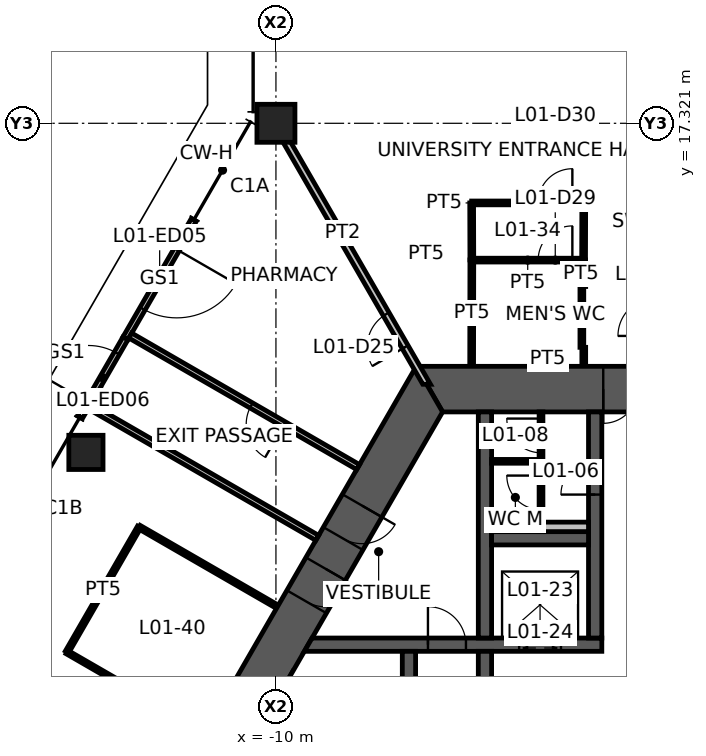
"""IFC4 building model, lengths in metres.
Left out: names, types, materials, properties, quantities, classifications, styles, units other than length and angle.
Written with IfcOpenShell. Run it as: python <this file> out.ifc"""

import sys

from ifc_helpers import new_model, si_unit, direction, frame, frame_2d, origin, origin_2d, place, context, subcontext, project, spatial, polyline, rectangle, hollow_rectangle, outline, extrude, element, fill, save


model = new_model("IFC4")
c1 = context("Model", 3, precision=1e-05, world=origin(), true_north=direction((0.0, 1.0)))
c2 = subcontext(c1, "Body", "Model", "MODEL_VIEW")
j1 = project(units=[si_unit("LENGTHUNIT", "METRE"), si_unit("PLANEANGLEUNIT", "RADIAN")], contexts=[c1])
p1 = place(None, origin())
s1 = spatial("IfcSite", under=j1, at=p1, CompositionType="ELEMENT")
p2 = place(p1, origin())
s2 = spatial("IfcBuilding", under=s1, at=p2, CompositionType="ELEMENT")
p3 = place(p2, origin())
s3 = spatial("IfcBuildingStorey", under=s2, at=p3, CompositionType="ELEMENT", Elevation=0.0)
p4 = place(p3, frame((-10.0, 17.321, 0.0), z_axis=(0.0, 0.0, 1.0), x_axis=(1.0, 0.0, 0.0)))
e1 = element("IfcColumn", 1, at=p4, inside=s3, PredefinedType="COLUMN", context=c2, shape_type="SweptSolid", body=[
    extrude(hollow_rectangle(XDim=1.0, YDim=1.0, WallThickness=0.06, at=origin_2d()), origin(), (0.0, 0.0, 1.0), 5.5),
])
p5 = place(p3, frame((-15.0, 8.66, 0.0), z_axis=(0.0, 0.0, 1.0), x_axis=(1.0, 0.0, 0.0)))
e2 = element("IfcColumn", 2, at=p5, inside=s3, PredefinedType="COLUMN", context=c2, shape_type="SweptSolid", body=[
    extrude(hollow_rectangle(XDim=0.9, YDim=0.9, WallThickness=0.05, at=origin_2d()), origin(), (0.0, 0.0, 1.0), 5.5),
])
p6 = place(p3, frame((5.961, 10.325, 0.0), z_axis=(0.0, 0.0, 1.0), x_axis=(-1.0, 0.0, 0.0)))
e3 = element("IfcWall", 3, at=p6, inside=s3, PredefinedType="SHEAR", context=c2, shape_type="SweptSolid", body=[
    extrude(outline(polyline([(-0.346, -0.6), (4.574, -0.6), (5.474, -0.6), (6.449, -0.6), (7.349, -0.6), (12.269, -0.6), (11.576, 0.6), (7.349, 0.6), (6.449, 0.6), (5.474, 0.6), (4.574, 0.6), (0.346, 0.6), (-0.346, -0.6)])), origin(), (0.0, 0.0, 1.0), 5.5),
])
p7 = place(p6, frame((6.449, 0.0, 0.0)))
e4 = element("IfcOpeningElement", 4, at=p7, cuts=e3, PredefinedType="OPENING", context=c2, shape_type="SweptSolid", body=[
    extrude(rectangle(XDim=0.9, YDim=2.1, at=frame_2d((0.45, 1.05))), frame((0.0, 0.61, 0.0), z_axis=(0.0, -1.0, 0.0), x_axis=(1.0, 0.0, 0.0)), (0.0, 0.0, 1.0), 1.22),
])
p8 = place(p6, frame((4.574, 0.0, 0.0)))
e5 = element("IfcOpeningElement", 5, at=p8, cuts=e3, PredefinedType="OPENING", context=c2, shape_type="SweptSolid", body=[
    extrude(rectangle(XDim=0.9, YDim=2.1, at=frame_2d((0.45, 1.05))), frame((0.0, 0.61, 0.0), z_axis=(0.0, -1.0, 0.0), x_axis=(1.0, 0.0, 0.0)), (0.0, 0.0, 1.0), 1.22),
])
p9 = place(p3, frame((-5.961, 10.325, 0.0), z_axis=(0.0, 0.0, 1.0), x_axis=(-0.500004296715, -0.866022923061, 0.0)))
e6 = element("IfcWall", 6, at=p9, inside=s3, PredefinedType="SHEAR", context=c2, shape_type="SweptSolid", body=[
    extrude(outline(polyline([(-0.346, -0.6), (3.541, -0.6), (4.541, -0.6), (5.461, -0.6), (6.461, -0.6), (12.269, -0.6), (11.576, 0.6), (6.461, 0.6), (5.461, 0.6), (4.541, 0.6), (3.541, 0.6), (0.346, 0.6), (-0.346, -0.6)])), origin(), (0.0, 0.0, 1.0), 5.5),
])
p10 = place(p9, frame((3.541, 0.0, 0.0)))
e7 = element("IfcOpeningElement", 7, at=p10, cuts=e6, PredefinedType="OPENING", context=c2, shape_type="SweptSolid", body=[
    extrude(rectangle(XDim=1.0, YDim=2.1, at=frame_2d((0.5, 1.05))), frame((0.0, 0.61, 0.0), z_axis=(0.0, -1.0, 0.0), x_axis=(1.0, 0.0, 0.0)), (0.0, 0.0, 1.0), 1.22),
])
p11 = place(p9, frame((5.461, 0.0, 0.0)))
e8 = element("IfcOpeningElement", 8, at=p11, cuts=e6, PredefinedType="OPENING", context=c2, shape_type="SweptSolid", body=[
    extrude(rectangle(XDim=1.0, YDim=2.1, at=frame_2d((0.5, 1.05))), frame((0.0, 0.61, 0.0), z_axis=(0.0, -1.0, 0.0), x_axis=(1.0, 0.0, 0.0)), (0.0, 0.0, 1.0), 1.22),
])
p12 = place(p3, frame((-12.16, 14.78, 0.0), z_axis=(0.0, 0.0, 1.0), x_axis=(-0.499961193289, -0.866047807691, 0.0)))
e9 = element("IfcWall", 9, at=p12, inside=s3, PredefinedType="STANDARD", context=c2, shape_type="SweptSolid", body=[
    extrude(rectangle(XDim=3.6, YDim=0.15, at=frame_2d((1.8, 0.0))), origin(), (0.0, 0.0, 1.0), 5.5),
])
p13 = place(p12, frame((0.9, 0.0, 0.0)))
e10 = element("IfcOpeningElement", 10, at=p13, cuts=e9, PredefinedType="OPENING", context=c2, shape_type="SweptSolid", body=[
    extrude(rectangle(XDim=1.8, YDim=2.4, at=frame_2d((0.9, 1.2))), frame((0.0, 0.085, 0.0), z_axis=(0.0, -1.0, 0.0), x_axis=(1.0, 0.0, 0.0)), (0.0, 0.0, 1.0), 0.17),
])
p14 = place(p3, frame((-15.16, 9.584, 0.0), z_axis=(0.0, 0.0, 1.0), x_axis=(0.499957262057, 0.866050077142, 0.0)))
e11 = element("IfcWall", 11, at=p14, inside=s3, PredefinedType="STANDARD", context=c2, shape_type="SweptSolid", body=[
    extrude(rectangle(XDim=2.4, YDim=0.15, at=frame_2d((1.2, 0.0))), origin(), (0.0, 0.0, 1.0), 5.5),
])
p15 = place(p14, frame((0.45, 0.0, 0.0)))
e12 = element("IfcOpeningElement", 12, at=p15, cuts=e11, PredefinedType="OPENING", context=c2, shape_type="SweptSolid", body=[
    extrude(rectangle(XDim=1.5, YDim=2.4, at=frame_2d((0.75, 1.2))), frame((0.0, 0.085, 0.0), z_axis=(0.0, -1.0, 0.0), x_axis=(1.0, 0.0, 0.0)), (0.0, 0.0, 1.0), 0.17),
])
p16 = place(p3, frame((-9.151, 3.6, 0.0), z_axis=(0.0, 0.0, 1.0), x_axis=(1.0, 0.0, 0.0)))
e13 = element("IfcWall", 13, at=p16, inside=s3, PredefinedType="SHEAR", context=c2, shape_type="SweptSolid", body=[
    extrude(outline(polyline([(-0.101, -0.175), (3.151, -0.175), (4.151, -0.175), (5.551, -0.175), (6.651, -0.175), (7.726, -0.175), (7.726, 0.175), (6.651, 0.175), (5.551, 0.175), (4.151, 0.175), (3.151, 0.175), (0.101, 0.175), (-0.101, -0.175)])), origin(), (0.0, 0.0, 1.0), 5.5),
])
p17 = place(p16, frame((3.151, 0.0, 0.0)))
e14 = element("IfcOpeningElement", 14, at=p17, cuts=e13, PredefinedType="OPENING", context=c2, shape_type="SweptSolid", body=[
    extrude(rectangle(XDim=1.0, YDim=2.1, at=frame_2d((0.5, 1.05))), frame((0.0, 0.185, 0.0), z_axis=(0.0, -1.0, 0.0), x_axis=(1.0, 0.0, 0.0)), (0.0, 0.0, 1.0), 0.37),
])
p18 = place(p16, frame((5.551, 0.0, 0.0)))
e15 = element("IfcOpeningElement", 15, at=p18, cuts=e13, PredefinedType="OPENING", context=c2, shape_type="SweptSolid", body=[
    extrude(rectangle(XDim=1.1, YDim=2.1, at=frame_2d((0.55, 1.05))), frame((0.0, 0.185, 0.0), z_axis=(0.0, -1.0, 0.0), x_axis=(1.0, 0.0, 0.0)), (0.0, 0.0, 1.0), 0.37),
])
p19 = place(p3, frame((-1.6, 3.775, 0.0), z_axis=(0.0, 0.0, 1.0), x_axis=(0.0, 1.0, 0.0)))
e16 = element("IfcWall", 16, at=p19, inside=s3, PredefinedType="SHEAR", context=c2, shape_type="SweptSolid", body=[
    extrude(rectangle(XDim=5.95, YDim=0.35, at=frame_2d((2.975, 0.0))), origin(), (0.0, 0.0, 1.0), 5.5),
])
p20 = place(p19, frame((3.775, 0.0, 0.0)))
e17 = element("IfcOpeningElement", 17, at=p20, cuts=e16, PredefinedType="OPENING", context=c2, shape_type="SweptSolid", body=[
    extrude(rectangle(XDim=0.9, YDim=2.1, at=frame_2d((0.45, 1.05))), frame((0.0, 0.185, 0.0), z_axis=(0.0, -1.0, 0.0), x_axis=(1.0, 0.0, 0.0)), (0.0, 0.0, 1.0), 0.37),
])
p21 = place(p3, frame((-4.5, -3.425, 0.0), z_axis=(0.0, 0.0, 1.0), x_axis=(0.0, 1.0, 0.0)))
e18 = element("IfcWall", 18, at=p21, inside=s3, PredefinedType="SHEAR", context=c2, shape_type="SweptSolid", body=[
    extrude(rectangle(XDim=6.85, YDim=0.35, at=frame_2d((3.425, 0.0))), origin(), (0.0, 0.0, 1.0), 5.5),
])
p22 = place(p21, frame((2.925, 0.0, 0.0)))
e19 = element("IfcOpeningElement", 19, at=p22, cuts=e18, PredefinedType="OPENING", context=c2, shape_type="SweptSolid", body=[
    extrude(rectangle(XDim=1.0, YDim=2.1, at=frame_2d((0.5, 1.05))), frame((0.0, 0.185, 0.0), z_axis=(0.0, -1.0, 0.0), x_axis=(1.0, 0.0, 0.0)), (0.0, 0.0, 1.0), 0.37),
])
p23 = place(p3, frame((-6.5, -3.425, 0.0), z_axis=(0.0, 0.0, 1.0), x_axis=(0.0, 1.0, 0.0)))
e20 = element("IfcWall", 20, at=p23, inside=s3, PredefinedType="SHEAR", context=c2, shape_type="SweptSolid", body=[
    extrude(rectangle(XDim=6.85, YDim=0.35, at=frame_2d((3.425, 0.0))), origin(), (0.0, 0.0, 1.0), 5.5),
])
p24 = place(p23, frame((0.1, 0.0, 0.0)))
e21 = element("IfcOpeningElement", 21, at=p24, cuts=e20, PredefinedType="OPENING", context=c2, shape_type="SweptSolid", body=[
    extrude(rectangle(XDim=1.0, YDim=2.1, at=frame_2d((0.5, 1.05))), frame((0.0, 0.185, 0.0), z_axis=(0.0, -1.0, 0.0), x_axis=(1.0, 0.0, 0.0)), (0.0, 0.0, 1.0), 0.37),
])
p25 = place(p3, frame((-4.5, 3.775, 0.0), z_axis=(0.0, 0.0, 1.0), x_axis=(0.0, 1.0, 0.0)))
e22 = element("IfcWall", 22, at=p25, inside=s3, PredefinedType="SHEAR", context=c2, shape_type="SweptSolid", body=[
    extrude(rectangle(XDim=5.95, YDim=0.35, at=frame_2d((2.975, 0.0))), origin(), (0.0, 0.0, 1.0), 5.5),
])
p26 = place(p3, frame((-4.325, 6.4, 0.0), z_axis=(0.0, 0.0, 1.0), x_axis=(1.0, 0.0, 0.0)))
e23 = element("IfcWall", 23, at=p26, inside=s3, PredefinedType="SHEAR", context=c2, shape_type="SweptSolid", body=[
    extrude(rectangle(XDim=2.55, YDim=0.35, at=frame_2d((1.275, 0.0))), origin(), (0.0, 0.0, 1.0), 5.5),
])
p27 = place(p3, frame((-4.325, 6.7, 0.0), z_axis=(0.0, 0.0, 1.0), x_axis=(1.0, 0.0, 0.0)))
e24 = element("IfcWall", 24, at=p27, inside=s3, PredefinedType="PLUMBINGWALL", context=c2, shape_type="SweptSolid", body=[
    extrude(rectangle(XDim=2.55, YDim=0.25, at=frame_2d((1.275, 0.0))), origin(), (0.0, 0.0, 1.0), 5.5),
])
p28 = place(p3, frame((-3.025, 6.575, 0.0), z_axis=(0.0, 0.0, 1.0), x_axis=(0.0, 1.0, 0.0)))
e25 = element("IfcWall", 25, at=p28, inside=s3, PredefinedType="PARTITIONING", context=c2, shape_type="SweptSolid", body=[
    extrude(rectangle(XDim=3.15, YDim=0.1, at=frame_2d((1.575, 0.0))), origin(), (0.0, 0.0, 1.0), 4.5),
])
p29 = place(p28, frame((0.575, 0.0, 0.0)))
e26 = element("IfcOpeningElement", 26, at=p29, cuts=e25, PredefinedType="OPENING", context=c2, shape_type="SweptSolid", body=[
    extrude(rectangle(XDim=0.9, YDim=2.1, at=frame_2d((0.45, 1.05))), frame((0.0, 0.06, 0.0), z_axis=(0.0, -1.0, 0.0), x_axis=(1.0, 0.0, 0.0)), (0.0, 0.0, 1.0), 0.12),
])
p30 = place(p28, frame((2.075, 0.0, 0.0)))
e27 = element("IfcOpeningElement", 27, at=p30, cuts=e25, PredefinedType="OPENING", context=c2, shape_type="SweptSolid", body=[
    extrude(rectangle(XDim=0.9, YDim=2.1, at=frame_2d((0.45, 1.05))), frame((0.0, 0.06, 0.0), z_axis=(0.0, -1.0, 0.0), x_axis=(1.0, 0.0, 0.0)), (0.0, 0.0, 1.0), 0.12),
])
p31 = place(p3, frame((-3.075, 8.425, 0.0), z_axis=(0.0, 0.0, 1.0), x_axis=(-1.0, 0.0, 0.0)))
e28 = element("IfcWall", 28, at=p31, inside=s3, PredefinedType="PARTITIONING", context=c2, shape_type="SweptSolid", body=[
    extrude(rectangle(XDim=1.25, YDim=0.1, at=frame_2d((0.625, 0.0))), origin(), (0.0, 0.0, 1.0), 4.5),
])
p32 = place(p3, frame((-6.035, 10.453, 0.0), z_axis=(0.0, 0.0, 1.0), x_axis=(-0.499993402427, 0.866029212861, 0.0)))
e29 = element("IfcWall", 29, at=p32, inside=s3, PredefinedType="PARTITIONING", context=c2, shape_type="SweptSolid", body=[
    extrude(outline(polyline([(-0.051, -0.087), (1.129, -0.087), (2.129, -0.087), (7.93, -0.087), (7.93, 0.087), (2.129, 0.087), (1.129, 0.087), (0.051, 0.087), (-0.051, -0.087)])), origin(), (0.0, 0.0, 1.0), 4.6),
])
p33 = place(p32, frame((1.129, 0.0, 0.0)))
e30 = element("IfcOpeningElement", 30, at=p33, cuts=e29, PredefinedType="OPENING", context=c2, shape_type="SweptSolid", body=[
    extrude(rectangle(XDim=1.0, YDim=2.1, at=frame_2d((0.5, 1.05))), frame((0.0, 0.098, 0.0), z_axis=(0.0, -1.0, 0.0), x_axis=(1.0, 0.0, 0.0)), (0.0, 0.0, 1.0), 0.195),
])
p34 = place(p3, frame((-4.85, 13.72, 0.0), z_axis=(0.0, 0.0, 1.0), x_axis=(1.0, 0.0, 0.0)))
e31 = element("IfcWall", 31, at=p34, inside=s3, PredefinedType="PARTITIONING", context=c2, shape_type="SweptSolid", body=[
    extrude(rectangle(XDim=2.95, YDim=0.1, at=frame_2d((1.475, 0.0))), origin(), (0.0, 0.0, 1.0), 4.5),
])
p35 = place(p34, frame((1.75, 0.0, 0.0)))
e32 = element("IfcOpeningElement", 32, at=p35, cuts=e31, PredefinedType="OPENING", context=c2, shape_type="SweptSolid", body=[
    extrude(rectangle(XDim=0.9, YDim=2.1, at=frame_2d((0.45, 1.05))), frame((0.0, 0.06, 0.0), z_axis=(0.0, -1.0, 0.0), x_axis=(1.0, 0.0, 0.0)), (0.0, 0.0, 1.0), 0.12),
])
p36 = place(p3, frame((-4.85, 10.945, 0.0), z_axis=(0.0, 0.0, 1.0), x_axis=(0.001756386155, 0.999998457553, 0.0)))
e33 = element("IfcWall", 33, at=p36, inside=s3, PredefinedType="PARTITIONING", context=c2, shape_type="SweptSolid", body=[
    extrude(rectangle(XDim=2.78, YDim=0.1, at=frame_2d((1.39, 0.0))), origin(), (0.0, 0.0, 1.0), 4.5),
])
p37 = place(p3, frame((-1.95, 13.025, 0.0), z_axis=(0.0, 0.0, 1.0), x_axis=(0.0, -1.0, 0.0)))
e34 = element("IfcWall", 34, at=p37, inside=s3, PredefinedType="PARTITIONING", context=c2, shape_type="SweptSolid", body=[
    extrude(rectangle(XDim=1.6, YDim=0.1, at=frame_2d((0.8, 0.0))), origin(), (0.0, 0.0, 1.0), 4.5),
])
p38 = place(p3, frame((-1.905, 13.725, 0.0), z_axis=(0.0, 0.0, 1.0), x_axis=(0.006624680291, -0.999978056565, 0.0)))
e35 = element("IfcWall", 35, at=p38, inside=s3, PredefinedType="PARTITIONING", context=c2, shape_type="SweptSolid", body=[
    extrude(rectangle(XDim=0.7, YDim=0.1, at=frame_2d((0.35, 0.0))), origin(), (0.0, 0.0, 1.0), 4.5),
])
p39 = place(p3, frame((-1.9, 11.425, 0.0), z_axis=(0.0, 0.0, 1.0), x_axis=(0.0, -1.0, 0.0)))
e36 = element("IfcWall", 36, at=p39, inside=s3, PredefinedType="PARTITIONING", context=c2, shape_type="SweptSolid", body=[
    extrude(rectangle(XDim=0.48, YDim=0.1, at=frame_2d((0.24, 0.0))), origin(), (0.0, 0.0, 1.0), 4.5),
])
p40 = place(p3, frame((-4.85, 15.225, 0.0), z_axis=(0.0, 0.0, 1.0), x_axis=(1.0, 0.0, 0.0)))
e37 = element("IfcWall", 37, at=p40, inside=s3, PredefinedType="PARTITIONING", context=c2, shape_type="SweptSolid", body=[
    extrude(rectangle(XDim=2.95, YDim=0.1, at=frame_2d((1.475, 0.0))), origin(), (0.0, 0.0, 1.0), 4.5),
])
p41 = place(p40, frame((1.75, 0.0, 0.0)))
e38 = element("IfcOpeningElement", 38, at=p41, cuts=e37, PredefinedType="OPENING", context=c2, shape_type="SweptSolid", body=[
    extrude(rectangle(XDim=0.9, YDim=2.1, at=frame_2d((0.45, 1.05))), frame((0.0, 0.06, 0.0), z_axis=(0.0, -1.0, 0.0), x_axis=(1.0, 0.0, 0.0)), (0.0, 0.0, 1.0), 0.12),
])
for number, where, z_axis, x_axis in (
    (39, (-4.845, 13.725, 0.0), (0.0, 0.0, 1.0), (-0.003, 1.0, 0.0)),
    (40, (-1.9, 15.225, 0.0), (0.0, 0.0, 1.0), (-0.003, -1.0, 0.0)),
):
    element("IfcWall", number, at=place(p3, frame(where, z_axis=z_axis, x_axis=x_axis)), inside=s3, PredefinedType="PARTITIONING", context=c2, shape_type="SweptSolid", body=[
        extrude(rectangle(XDim=1.5, YDim=0.1, at=frame_2d((0.75, 0.0))), origin(), (0.0, 0.0, 1.0), 4.5),
    ])
p42 = place(p3, frame((-7.838, 8.274, 0.0), z_axis=(0.0, 0.0, 1.0), x_axis=(-0.866012988868, 0.50002150265, 0.0)))
e41 = element("IfcWall", 41, at=p42, inside=s3, PredefinedType="PARTITIONING", context=c2, shape_type="SweptSolid", body=[
    extrude(rectangle(XDim=6.926, YDim=0.15, at=frame_2d((3.463, 0.0))), origin(), (0.0, 0.0, 1.0), 4.5),
])
p43 = place(p42, frame((2.246, 0.0, 0.0)))
e42 = element("IfcOpeningElement", 42, at=p43, cuts=e41, PredefinedType="OPENING", context=c2, shape_type="SweptSolid", body=[
    extrude(rectangle(XDim=1.0, YDim=2.1, at=frame_2d((0.5, 1.05))), frame((0.0, 0.085, 0.0), z_axis=(0.0, -1.0, 0.0), x_axis=(1.0, 0.0, 0.0)), (0.0, 0.0, 1.0), 0.17),
])
p44 = place(p3, frame((-8.914, 6.411, 0.0), z_axis=(0.0, 0.0, 1.0), x_axis=(-0.866025337903, 0.500000114109, 0.0)))
e43 = element("IfcWall", 43, at=p44, inside=s3, PredefinedType="PARTITIONING", context=c2, shape_type="SweptSolid", body=[
    extrude(rectangle(XDim=6.875, YDim=0.15, at=frame_2d((3.438, 0.0))), origin(), (0.0, 0.0, 1.0), 4.5),
])
p45 = place(p3, frame((-15.499, 3.406, 0.0), z_axis=(0.0, 0.0, 1.0), x_axis=(0.499967155389, 0.866044365799, 0.0)))
e44 = element("IfcWall", 44, at=p45, inside=s3, PredefinedType="PARTITIONING", context=c2, shape_type="SweptSolid", body=[
    extrude(rectangle(XDim=3.8, YDim=0.1, at=frame_2d((1.9, 0.0))), origin(), (0.0, 0.0, 1.0), 4.5),
])
p46 = place(p3, frame((-13.599, 6.697, 0.0), z_axis=(0.0, 0.0, 1.0), x_axis=(0.866024134012, -0.500002199304, 0.0)))
e45 = element("IfcWall", 45, at=p46, inside=s3, PredefinedType="PARTITIONING", context=c2, shape_type="SweptSolid", body=[
    extrude(rectangle(XDim=4.18, YDim=0.1, at=frame_2d((2.09, 0.0))), origin(), (0.0, 0.0, 1.0), 4.5),
])
p47 = place(p3, frame((-11.879, 1.316, 0.0), z_axis=(0.0, 0.0, 1.0), x_axis=(-0.866034823405, 0.499983684383, 0.0)))
e46 = element("IfcWall", 46, at=p47, inside=s3, PredefinedType="PARTITIONING", context=c2, shape_type="SweptSolid", body=[
    extrude(rectangle(XDim=4.18, YDim=0.1, at=frame_2d((2.09, 0.0))), origin(), (0.0, 0.0, 1.0), 4.5),
])
p48 = place(p47, frame((0.3, 0.0, 0.0)))
e47 = element("IfcOpeningElement", 47, at=p48, cuts=e46, PredefinedType="OPENING", context=c2, shape_type="SweptSolid", body=[
    extrude(rectangle(XDim=0.9, YDim=2.1, at=frame_2d((0.45, 1.05))), frame((0.0, 0.06, 0.0), z_axis=(0.0, -1.0, 0.0), x_axis=(1.0, 0.0, 0.0)), (0.0, 0.0, 1.0), 0.12),
])
p49 = place(p13, origin())
e48 = element("IfcDoor", 48, at=p49, inside=s3, OperationType="DOUBLE_DOOR_SINGLE_SWING", PredefinedType="DOOR", context=c2, shape_type="SweptSolid", body=[
    extrude(rectangle(XDim=1.8, YDim=2.4, at=frame_2d((0.9, 1.2))), frame((0.0, 0.025, 0.0), z_axis=(0.0, -1.0, 0.0), x_axis=(1.0, 0.0, 0.0)), (0.0, 0.0, 1.0), 0.05),
])
fill(e10, e48)
p50 = place(p15, origin())
e49 = element("IfcDoor", 49, at=p50, inside=s3, OperationType="DOUBLE_DOOR_SINGLE_SWING", PredefinedType="DOOR", context=c2, shape_type="SweptSolid", body=[
    extrude(rectangle(XDim=1.5, YDim=2.4, at=frame_2d((0.75, 1.2))), frame((0.0, 0.025, 0.0), z_axis=(0.0, -1.0, 0.0), x_axis=(1.0, 0.0, 0.0)), (0.0, 0.0, 1.0), 0.05),
])
fill(e12, e49)
p51 = place(p7, origin())
e50 = element("IfcDoor", 50, at=p51, inside=s3, OperationType="SINGLE_SWING_RIGHT", PredefinedType="DOOR", context=c2, shape_type="SweptSolid", body=[
    extrude(rectangle(XDim=0.9, YDim=2.1, at=frame_2d((0.45, 1.05))), frame((0.0, 0.025, 0.0), z_axis=(0.0, -1.0, 0.0), x_axis=(1.0, 0.0, 0.0)), (0.0, 0.0, 1.0), 0.05),
])
fill(e4, e50)
p52 = place(p10, origin())
e51 = element("IfcDoor", 51, at=p52, inside=s3, OperationType="SINGLE_SWING_LEFT", PredefinedType="DOOR", context=c2, shape_type="SweptSolid", body=[
    extrude(rectangle(XDim=1.0, YDim=2.1, at=frame_2d((0.5, 1.05))), frame((0.0, 0.025, 0.0), z_axis=(0.0, -1.0, 0.0), x_axis=(1.0, 0.0, 0.0)), (0.0, 0.0, 1.0), 0.05),
])
fill(e7, e51)
p53 = place(p17, origin())
e52 = element("IfcDoor", 52, at=p53, inside=s3, OperationType="SINGLE_SWING_LEFT", PredefinedType="DOOR", context=c2, shape_type="SweptSolid", body=[
    extrude(rectangle(XDim=1.0, YDim=2.1, at=frame_2d((0.5, 1.05))), frame((0.0, 0.025, 0.0), z_axis=(0.0, -1.0, 0.0), x_axis=(1.0, 0.0, 0.0)), (0.0, 0.0, 1.0), 0.05),
])
fill(e14, e52)
p54 = place(p20, origin())
e53 = element("IfcDoor", 53, at=p54, inside=s3, OperationType="SINGLE_SWING_LEFT", PredefinedType="DOOR", context=c2, shape_type="SweptSolid", body=[
    extrude(rectangle(XDim=0.9, YDim=2.1, at=frame_2d((0.45, 1.05))), frame((0.0, 0.025, 0.0), z_axis=(0.0, -1.0, 0.0), x_axis=(1.0, 0.0, 0.0)), (0.0, 0.0, 1.0), 0.05),
])
fill(e17, e53)
p55 = place(p29, origin())
e54 = element("IfcDoor", 54, at=p55, inside=s3, OperationType="SINGLE_SWING_RIGHT", PredefinedType="DOOR", context=c2, shape_type="SweptSolid", body=[
    extrude(rectangle(XDim=0.9, YDim=2.1, at=frame_2d((0.45, 1.05))), frame((0.0, 0.025, 0.0), z_axis=(0.0, -1.0, 0.0), x_axis=(1.0, 0.0, 0.0)), (0.0, 0.0, 1.0), 0.05),
])
fill(e26, e54)
p56 = place(p30, origin())
e55 = element("IfcDoor", 55, at=p56, inside=s3, OperationType="SINGLE_SWING_RIGHT", PredefinedType="DOOR", context=c2, shape_type="SweptSolid", body=[
    extrude(rectangle(XDim=0.9, YDim=2.1, at=frame_2d((0.45, 1.05))), frame((0.0, 0.025, 0.0), z_axis=(0.0, -1.0, 0.0), x_axis=(1.0, 0.0, 0.0)), (0.0, 0.0, 1.0), 0.05),
])
fill(e27, e55)
p57 = place(p33, origin())
e56 = element("IfcDoor", 56, at=p57, inside=s3, OperationType="SINGLE_SWING_LEFT", PredefinedType="DOOR", context=c2, shape_type="SweptSolid", body=[
    extrude(rectangle(XDim=1.0, YDim=2.1, at=frame_2d((0.5, 1.05))), frame((0.0, 0.025, 0.0), z_axis=(0.0, -1.0, 0.0), x_axis=(1.0, 0.0, 0.0)), (0.0, 0.0, 1.0), 0.05),
])
fill(e30, e56)
p58 = place(p35, origin())
e57 = element("IfcDoor", 57, at=p58, inside=s3, OperationType="SINGLE_SWING_RIGHT", PredefinedType="DOOR", context=c2, shape_type="SweptSolid", body=[
    extrude(rectangle(XDim=0.9, YDim=2.1, at=frame_2d((0.45, 1.05))), frame((0.0, 0.025, 0.0), z_axis=(0.0, -1.0, 0.0), x_axis=(1.0, 0.0, 0.0)), (0.0, 0.0, 1.0), 0.05),
])
fill(e32, e57)
p59 = place(p41, origin())
e58 = element("IfcDoor", 58, at=p59, inside=s3, OperationType="SINGLE_SWING_RIGHT", PredefinedType="DOOR", context=c2, shape_type="SweptSolid", body=[
    extrude(rectangle(XDim=0.9, YDim=2.1, at=frame_2d((0.45, 1.05))), frame((0.0, 0.025, 0.0), z_axis=(0.0, -1.0, 0.0), x_axis=(1.0, 0.0, 0.0)), (0.0, 0.0, 1.0), 0.05),
])
fill(e38, e58)
p60 = place(p43, origin())
e59 = element("IfcDoor", 59, at=p60, inside=s3, OperationType="SINGLE_SWING_LEFT", PredefinedType="DOOR", context=c2, shape_type="SweptSolid", body=[
    extrude(rectangle(XDim=1.0, YDim=2.1, at=frame_2d((0.5, 1.05))), frame((0.0, 0.025, 0.0), z_axis=(0.0, -1.0, 0.0), x_axis=(1.0, 0.0, 0.0)), (0.0, 0.0, 1.0), 0.05),
])
fill(e42, e59)
p61 = place(p11, origin())
e60 = element("IfcDoor", 60, at=p61, inside=s3, OperationType="SINGLE_SWING_LEFT", PredefinedType="DOOR", context=c2, shape_type="SweptSolid", body=[
    extrude(rectangle(XDim=1.0, YDim=2.1, at=frame_2d((0.5, 1.05))), frame((0.0, 0.025, 0.0), z_axis=(0.0, -1.0, 0.0), x_axis=(1.0, 0.0, 0.0)), (0.0, 0.0, 1.0), 0.05),
])
fill(e8, e60)
p62 = place(p18, origin())
e61 = element("IfcDoor", 61, at=p62, inside=s3, OperationType="DOUBLE_DOOR_SLIDING", PredefinedType="DOOR", context=c2, shape_type="SweptSolid", body=[
    extrude(rectangle(XDim=1.1, YDim=2.1, at=frame_2d((0.55, 1.05))), frame((0.0, 0.025, 0.0), z_axis=(0.0, -1.0, 0.0), x_axis=(1.0, 0.0, 0.0)), (0.0, 0.0, 1.0), 0.05),
])
fill(e15, e61)
save(model, sys.argv[1])
